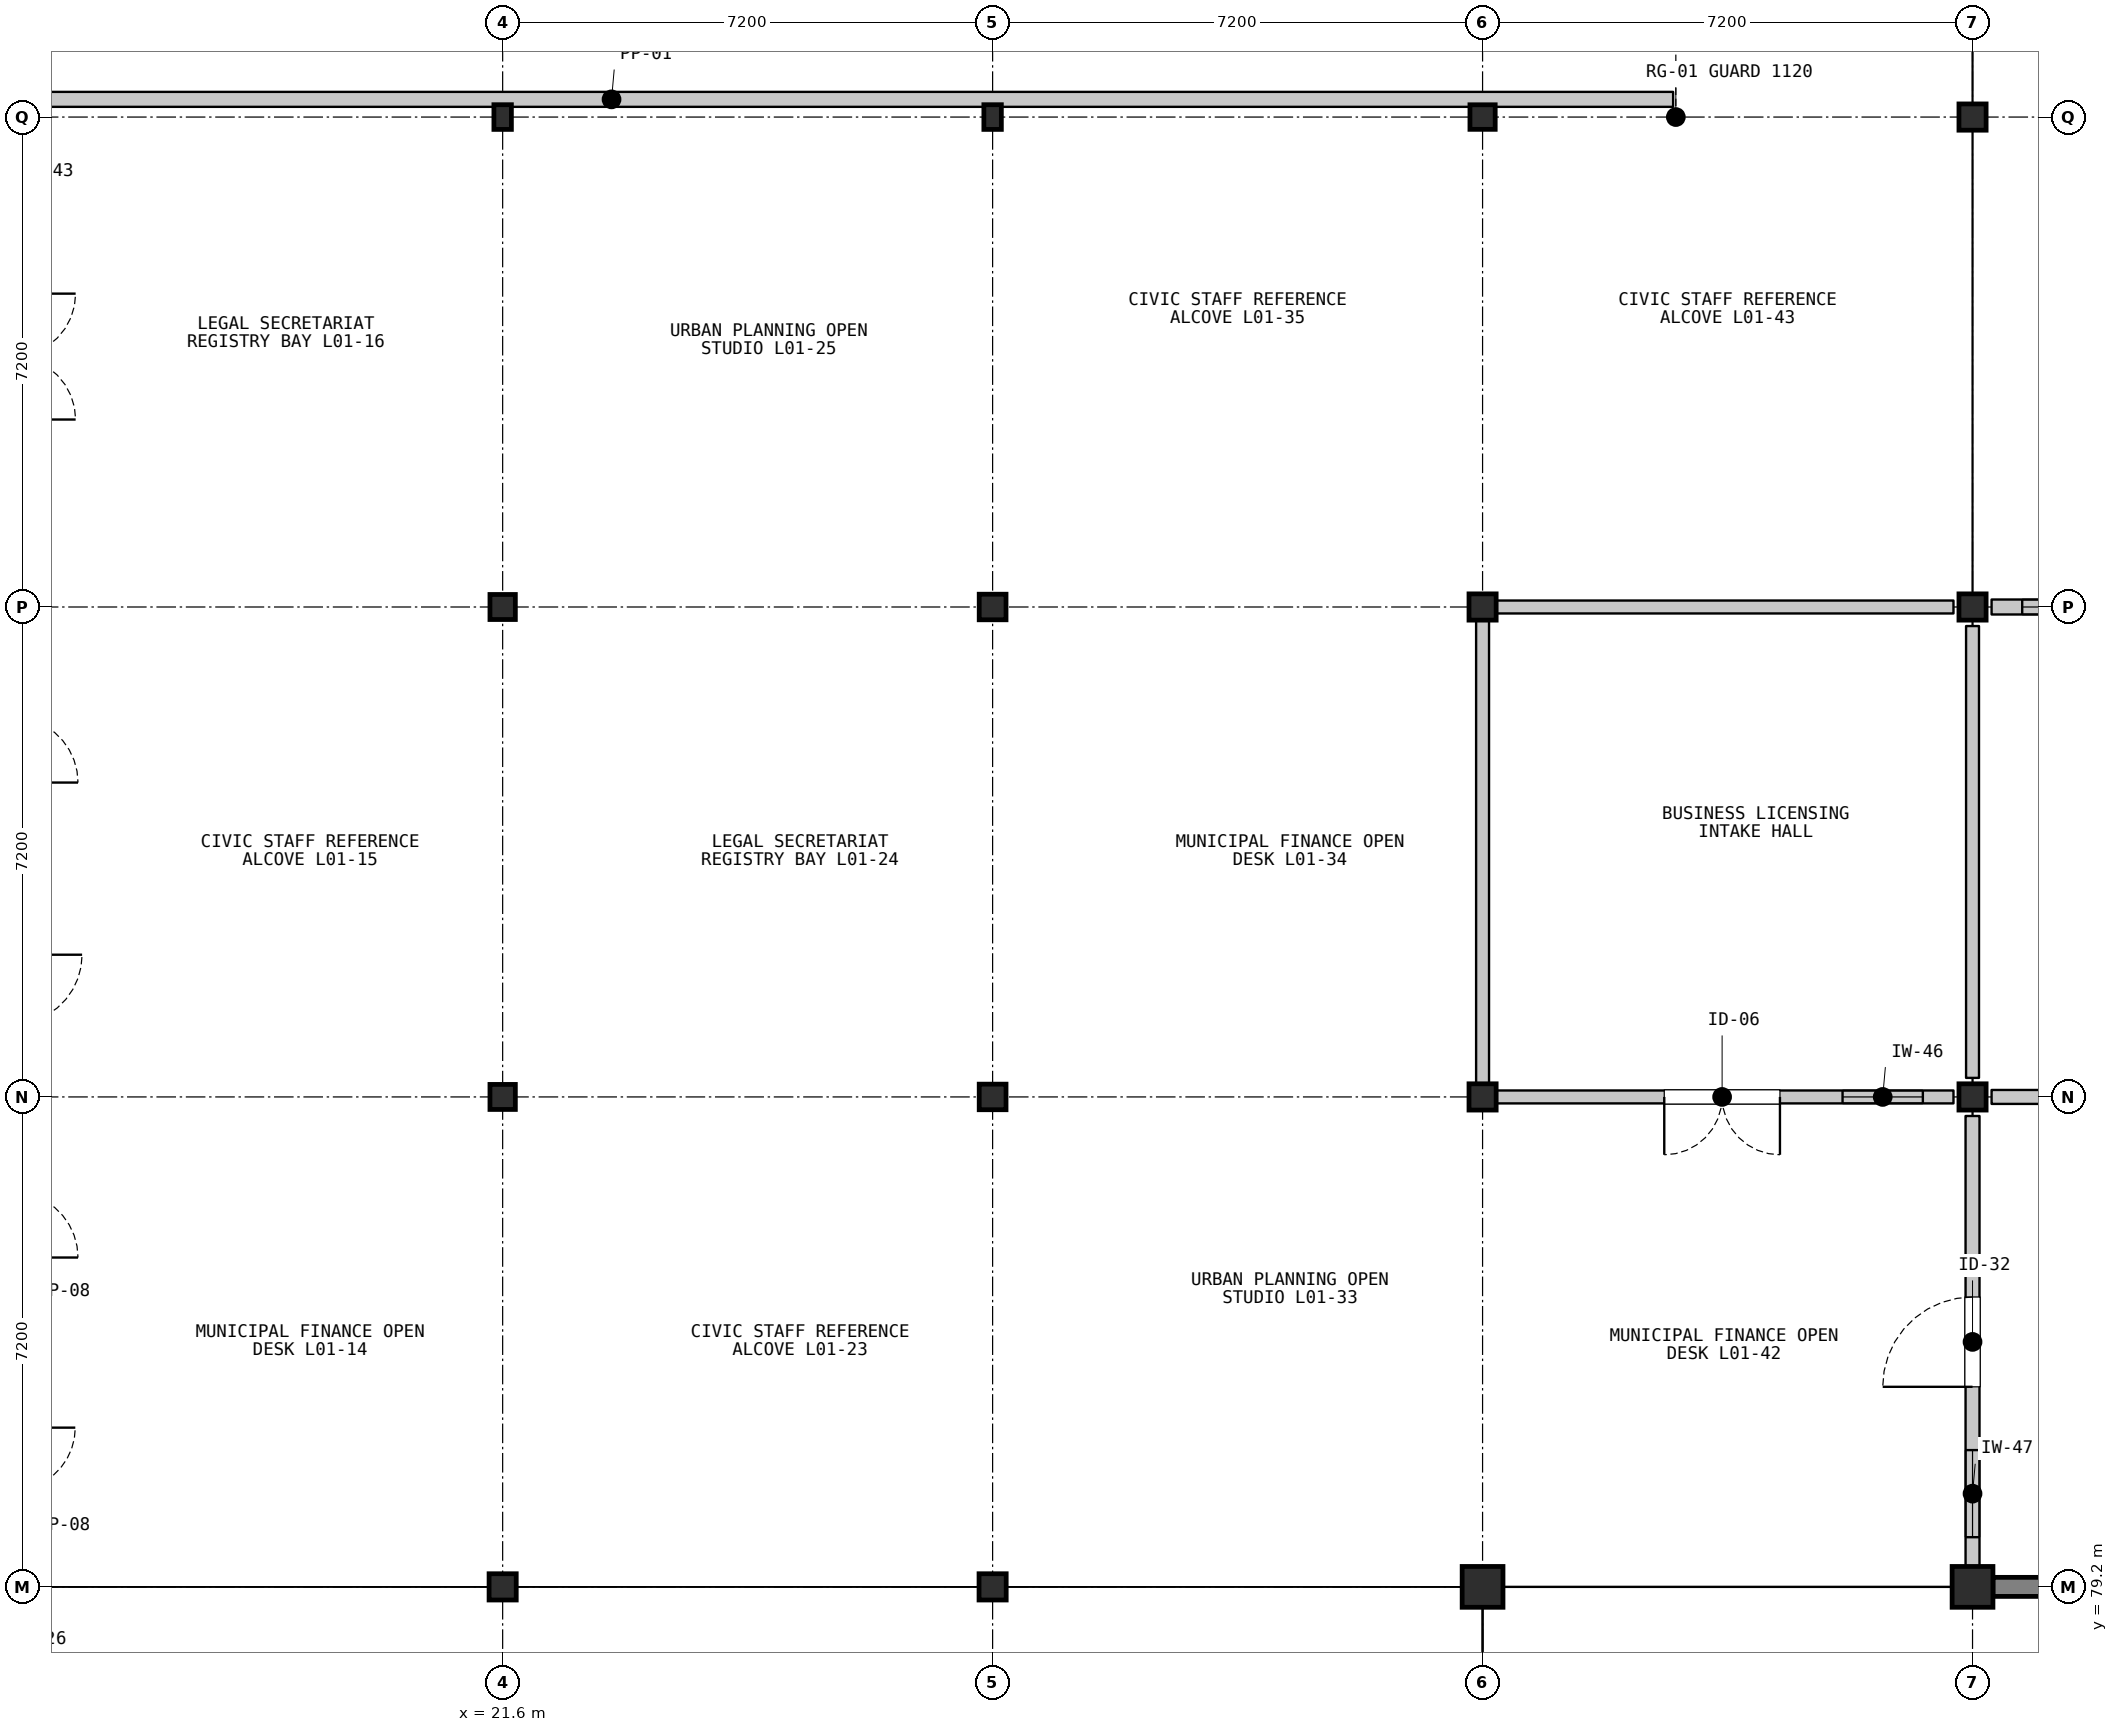
"""IFC4 building model, lengths in metres.
Left out: names, types, materials, properties, quantities, classifications, styles, units other than length and angle.
Written with IfcOpenShell. Run it as: python <this file> out.ifc"""

import sys

from ifc_helpers import new_model, si_unit, direction, frame, frame_2d, origin, origin_2d, place, context, subcontext, project, spatial, rectangle, i_section, extrude, element, fill, save


model = new_model("IFC4")
c1 = context("Model", 3, precision=1e-05, world=origin(), true_north=direction((0.0, 1.0)))
c2 = subcontext(c1, "Body", "Model", "MODEL_VIEW")
j1 = project(units=[si_unit("LENGTHUNIT", "METRE"), si_unit("PLANEANGLEUNIT", "RADIAN")], contexts=[c1])
p1 = place(None, origin())
s1 = spatial("IfcSite", under=j1, at=p1, CompositionType="ELEMENT")
p2 = place(p1, origin())
s2 = spatial("IfcBuilding", under=s1, at=p2, CompositionType="ELEMENT")
p3 = place(p2, origin())
s3 = spatial("IfcBuildingStorey", under=s2, at=p3, CompositionType="ELEMENT", Elevation=0.0)
p4 = place(p3, frame((21.6, 79.2, 0.0), z_axis=(0.0, 0.0, 1.0), x_axis=(1.0, 0.0, 0.0)))
e1 = element("IfcColumn", 1, at=p4, inside=s3, PredefinedType="COLUMN", context=c2, shape_type="SweptSolid", body=[
    extrude(i_section(OverallWidth=0.399, OverallDepth=0.386, WebThickness=0.021, FlangeThickness=0.033, FilletRadius=0.015, at=origin_2d()), origin(), (0.0, 0.0, 1.0), 5.4),
])
for number, where, z_axis, x_axis in (
    (2, (21.6, 86.4, 0.0), (0.0, 0.0, 1.0), (1.0, 0.0, 0.0)),
    (3, (21.6, 93.6, 0.0), (0.0, 0.0, 1.0), (1.0, 0.0, 0.0)),
):
    element("IfcColumn", number, at=place(p3, frame(where, z_axis=z_axis, x_axis=x_axis)), inside=s3, PredefinedType="COLUMN", context=c2, shape_type="SweptSolid", body=[
        extrude(i_section(OverallWidth=0.373, OverallDepth=0.368, WebThickness=0.015, FlangeThickness=0.024, FilletRadius=0.015, at=origin_2d()), origin(), (0.0, 0.0, 1.0), 5.4),
    ])
p5 = place(p3, frame((21.6, 100.8, 0.0), z_axis=(0.0, 0.0, 1.0), x_axis=(1.0, 0.0, 0.0)))
e4 = element("IfcColumn", 4, at=p5, inside=s3, PredefinedType="COLUMN", context=c2, shape_type="SweptSolid", body=[
    extrude(i_section(OverallWidth=0.257, OverallDepth=0.363, WebThickness=0.013, FlangeThickness=0.022, FilletRadius=0.015, at=origin_2d()), origin(), (0.0, 0.0, 1.0), 5.4),
])
p6 = place(p3, frame((28.8, 79.2, 0.0), z_axis=(0.0, 0.0, 1.0), x_axis=(1.0, 0.0, 0.0)))
e5 = element("IfcColumn", 5, at=p6, inside=s3, PredefinedType="COLUMN", context=c2, shape_type="SweptSolid", body=[
    extrude(i_section(OverallWidth=0.399, OverallDepth=0.386, WebThickness=0.021, FlangeThickness=0.033, FilletRadius=0.015, at=origin_2d()), origin(), (0.0, 0.0, 1.0), 5.4),
])
for number, where, z_axis, x_axis in (
    (6, (28.8, 86.4, 0.0), (0.0, 0.0, 1.0), (1.0, 0.0, 0.0)),
    (7, (28.8, 93.6, 0.0), (0.0, 0.0, 1.0), (1.0, 0.0, 0.0)),
):
    element("IfcColumn", number, at=place(p3, frame(where, z_axis=z_axis, x_axis=x_axis)), inside=s3, PredefinedType="COLUMN", context=c2, shape_type="SweptSolid", body=[
        extrude(i_section(OverallWidth=0.394, OverallDepth=0.376, WebThickness=0.017, FlangeThickness=0.028, FilletRadius=0.015, at=origin_2d()), origin(), (0.0, 0.0, 1.0), 5.4),
    ])
p7 = place(p3, frame((28.8, 100.8, 0.0), z_axis=(0.0, 0.0, 1.0), x_axis=(1.0, 0.0, 0.0)))
e8 = element("IfcColumn", 8, at=p7, inside=s3, PredefinedType="COLUMN", context=c2, shape_type="SweptSolid", body=[
    extrude(i_section(OverallWidth=0.257, OverallDepth=0.363, WebThickness=0.013, FlangeThickness=0.022, FilletRadius=0.015, at=origin_2d()), origin(), (0.0, 0.0, 1.0), 5.4),
])
p8 = place(p3, frame((36.0, 79.2, 0.0), z_axis=(0.0, 0.0, 1.0), x_axis=(1.0, 0.0, 0.0)))
e9 = element("IfcColumn", 9, at=p8, inside=s3, PredefinedType="COLUMN", context=c2, shape_type="SweptSolid", body=[
    extrude(rectangle(XDim=0.6, YDim=0.6, at=origin_2d()), origin(), (0.0, 0.0, 1.0), 5.4),
])
for number, where, z_axis, x_axis in (
    (10, (36.0, 86.4, 0.0), (0.0, 0.0, 1.0), (1.0, 0.0, 0.0)),
    (11, (36.0, 93.6, 0.0), (0.0, 0.0, 1.0), (1.0, 0.0, 0.0)),
):
    element("IfcColumn", number, at=place(p3, frame(where, z_axis=z_axis, x_axis=x_axis)), inside=s3, PredefinedType="COLUMN", context=c2, shape_type="SweptSolid", body=[
        extrude(i_section(OverallWidth=0.399, OverallDepth=0.386, WebThickness=0.021, FlangeThickness=0.033, FilletRadius=0.015, at=origin_2d()), origin(), (0.0, 0.0, 1.0), 5.4),
    ])
p9 = place(p3, frame((36.0, 100.8, 0.0), z_axis=(0.0, 0.0, 1.0), x_axis=(1.0, 0.0, 0.0)))
e12 = element("IfcColumn", 12, at=p9, inside=s3, PredefinedType="COLUMN", context=c2, shape_type="SweptSolid", body=[
    extrude(i_section(OverallWidth=0.371, OverallDepth=0.361, WebThickness=0.012, FlangeThickness=0.02, FilletRadius=0.015, at=origin_2d()), origin(), (0.0, 0.0, 1.0), 5.4),
])
p10 = place(p3, frame((43.2, 79.2, 0.0), z_axis=(0.0, 0.0, 1.0), x_axis=(1.0, 0.0, 0.0)))
e13 = element("IfcColumn", 13, at=p10, inside=s3, PredefinedType="COLUMN", context=c2, shape_type="SweptSolid", body=[
    extrude(rectangle(XDim=0.6, YDim=0.6, at=origin_2d()), origin(), (0.0, 0.0, 1.0), 5.4),
])
for number, where, z_axis, x_axis in (
    (14, (43.2, 86.4, 0.0), (0.0, 0.0, 1.0), (1.0, 0.0, 0.0)),
    (15, (43.2, 93.6, 0.0), (0.0, 0.0, 1.0), (1.0, 0.0, 0.0)),
    (16, (43.2, 100.8, 0.0), (0.0, 0.0, 1.0), (1.0, 0.0, 0.0)),
):
    element("IfcColumn", number, at=place(p3, frame(where, z_axis=z_axis, x_axis=x_axis)), inside=s3, PredefinedType="COLUMN", context=c2, shape_type="SweptSolid", body=[
        extrude(i_section(OverallWidth=0.399, OverallDepth=0.386, WebThickness=0.021, FlangeThickness=0.033, FilletRadius=0.015, at=origin_2d()), origin(), (0.0, 0.0, 1.0), 5.4),
    ])
p11 = place(p3, frame((50.025, 79.2, 0.0), z_axis=(0.0, 0.0, 1.0), x_axis=(-1.0, 0.0, 0.0)))
e17 = element("IfcWall", 17, at=p11, inside=s3, PredefinedType="SOLIDWALL", context=c2, shape_type="SweptSolid", body=[
    extrude(rectangle(XDim=6.525, YDim=0.28, at=frame_2d((3.262, 0.0))), origin(), (0.0, 0.0, 1.0), 4.598),
])
p12 = place(p11, frame((0.966, 0.0, 0.95)))
e18 = element("IfcOpeningElement", 18, at=p12, cuts=e17, PredefinedType="OPENING", context=c2, shape_type="SweptSolid", body=[
    extrude(rectangle(XDim=1.2, YDim=1.7, at=frame_2d((0.6, 0.85))), frame((0.0, 0.15, 0.0), z_axis=(0.0, -1.0, 0.0), x_axis=(1.0, 0.0, 0.0)), (0.0, 0.0, 1.0), 0.3),
])
p13 = place(p11, frame((4.359, 0.0, 0.95)))
e19 = element("IfcOpeningElement", 19, at=p13, cuts=e17, PredefinedType="OPENING", context=c2, shape_type="SweptSolid", body=[
    extrude(rectangle(XDim=1.2, YDim=1.7, at=frame_2d((0.6, 0.85))), frame((0.0, 0.15, 0.0), z_axis=(0.0, -1.0, 0.0), x_axis=(1.0, 0.0, 0.0)), (0.0, 0.0, 1.0), 0.3),
])
p14 = place(p3, frame((7.6, 101.06, 0.0), z_axis=(0.0, 0.0, 1.0), x_axis=(1.0, 0.0, 0.0)))
e20 = element("IfcWall", 20, at=p14, inside=s3, PredefinedType="PARAPET", context=c2, shape_type="SweptSolid", body=[
    extrude(rectangle(XDim=31.2, YDim=0.22, at=frame_2d((15.6, 0.0))), origin(), (0.0, 0.0, 1.0), 1.15),
])
p15 = place(p3, frame((42.92, 86.4, 0.0), z_axis=(0.0, 0.0, 1.0), x_axis=(-1.0, 0.0, 0.0)))
e21 = element("IfcWall", 21, at=p15, inside=s3, PredefinedType="PARTITIONING", context=c2, shape_type="SweptSolid", body=[
    extrude(rectangle(XDim=6.8, YDim=0.19, at=frame_2d((3.4, 0.0))), origin(), (0.0, 0.0, 1.0), 4.588),
])
p16 = place(p15, frame((2.55, 0.0, 0.0)))
e22 = element("IfcOpeningElement", 22, at=p16, cuts=e21, PredefinedType="OPENING", context=c2, shape_type="SweptSolid", body=[
    extrude(rectangle(XDim=1.7, YDim=2.35, at=frame_2d((0.85, 1.175))), frame((0.0, 0.105, 0.0), z_axis=(0.0, -1.0, 0.0), x_axis=(1.0, 0.0, 0.0)), (0.0, 0.0, 1.0), 0.21),
])
p17 = place(p15, frame((0.45, 0.0, 1.05)))
e23 = element("IfcOpeningElement", 23, at=p17, cuts=e21, PredefinedType="OPENING", context=c2, shape_type="SweptSolid", body=[
    extrude(rectangle(XDim=1.18, YDim=1.44, at=frame_2d((0.59, 0.72))), frame((0.0, 0.105, 0.0), z_axis=(0.0, -1.0, 0.0), x_axis=(1.0, 0.0, 0.0)), (0.0, 0.0, 1.0), 0.21),
])
p18 = place(p3, frame((36.12, 93.6, 0.0), z_axis=(0.0, 0.0, 1.0), x_axis=(1.0, 0.0, 0.0)))
e24 = element("IfcWall", 24, at=p18, inside=s3, PredefinedType="PARTITIONING", context=c2, shape_type="SweptSolid", body=[
    extrude(rectangle(XDim=6.8, YDim=0.19, at=frame_2d((3.4, 0.0))), origin(), (0.0, 0.0, 1.0), 4.588),
])
p19 = place(p3, frame((36.0, 86.52, 0.0), z_axis=(0.0, 0.0, 1.0), x_axis=(0.0, 1.0, 0.0)))
e25 = element("IfcWall", 25, at=p19, inside=s3, PredefinedType="PARTITIONING", context=c2, shape_type="SweptSolid", body=[
    extrude(rectangle(XDim=6.96, YDim=0.19, at=frame_2d((3.48, 0.0))), origin(), (0.0, 0.0, 1.0), 4.588),
])
p20 = place(p3, frame((43.2, 93.32, 0.0), z_axis=(0.0, 0.0, 1.0), x_axis=(0.0, -1.0, 0.0)))
e26 = element("IfcWall", 26, at=p20, inside=s3, PredefinedType="PARTITIONING", context=c2, shape_type="SweptSolid", body=[
    extrude(rectangle(XDim=6.64, YDim=0.19, at=frame_2d((3.32, 0.0))), origin(), (0.0, 0.0, 1.0), 4.657),
])
p21 = place(p3, frame((43.2, 79.48, 0.0), z_axis=(0.0, 0.0, 1.0), x_axis=(0.0, 1.0, 0.0)))
e27 = element("IfcWall", 27, at=p21, inside=s3, PredefinedType="PARTITIONING", context=c2, shape_type="SweptSolid", body=[
    extrude(rectangle(XDim=6.64, YDim=0.205, at=frame_2d((3.32, 0.0))), origin(), (0.0, 0.0, 1.0), 4.657),
])
p22 = place(p21, frame((2.66, 0.0, 0.0)))
e28 = element("IfcOpeningElement", 28, at=p22, cuts=e27, PredefinedType="OPENING", context=c2, shape_type="SweptSolid", body=[
    extrude(rectangle(XDim=1.32, YDim=2.24, at=frame_2d((0.66, 1.12))), frame((0.0, 0.113, 0.0), z_axis=(0.0, -1.0, 0.0), x_axis=(1.0, 0.0, 0.0)), (0.0, 0.0, 1.0), 0.225),
])
p23 = place(p21, frame((0.45, 0.0, 1.05)))
e29 = element("IfcOpeningElement", 29, at=p23, cuts=e27, PredefinedType="OPENING", context=c2, shape_type="SweptSolid", body=[
    extrude(rectangle(XDim=1.28, YDim=1.44, at=frame_2d((0.64, 0.72))), frame((0.0, 0.113, 0.0), z_axis=(0.0, -1.0, 0.0), x_axis=(1.0, 0.0, 0.0)), (0.0, 0.0, 1.0), 0.225),
])
p24 = place(p3, frame((43.48, 86.4, 0.0), z_axis=(0.0, 0.0, 1.0), x_axis=(1.0, 0.0, 0.0)))
e30 = element("IfcWall", 30, at=p24, inside=s3, PredefinedType="PARTITIONING", context=c2, shape_type="SweptSolid", body=[
    extrude(rectangle(XDim=6.8, YDim=0.205, at=frame_2d((3.4, 0.0))), origin(), (0.0, 0.0, 1.0), 4.588),
])
p25 = place(p3, frame((43.48, 93.6, 0.0), z_axis=(0.0, 0.0, 1.0), x_axis=(1.0, 0.0, 0.0)))
e31 = element("IfcWall", 31, at=p25, inside=s3, PredefinedType="PARTITIONING", context=c2, shape_type="SweptSolid", body=[
    extrude(rectangle(XDim=6.8, YDim=0.22, at=frame_2d((3.4, 0.0))), origin(), (0.0, 0.0, 1.0), 4.588),
])
p26 = place(p25, frame((2.72, 0.0, 0.0)))
e32 = element("IfcOpeningElement", 32, at=p26, cuts=e31, PredefinedType="OPENING", context=c2, shape_type="SweptSolid", body=[
    extrude(rectangle(XDim=1.36, YDim=2.24, at=frame_2d((0.68, 1.12))), frame((0.0, 0.12, 0.0), z_axis=(0.0, -1.0, 0.0), x_axis=(1.0, 0.0, 0.0)), (0.0, 0.0, 1.0), 0.24),
])
p27 = place(p25, frame((0.45, 0.0, 1.05)))
e33 = element("IfcOpeningElement", 33, at=p27, cuts=e31, PredefinedType="OPENING", context=c2, shape_type="SweptSolid", body=[
    extrude(rectangle(XDim=1.38, YDim=1.44, at=frame_2d((0.69, 0.72))), frame((0.0, 0.12, 0.0), z_axis=(0.0, -1.0, 0.0), x_axis=(1.0, 0.0, 0.0)), (0.0, 0.0, 1.0), 0.24),
])
p28 = place(p16, origin())
e34 = element("IfcDoor", 34, at=p28, inside=s3, OperationType="DOUBLE_DOOR_SINGLE_SWING", PredefinedType="DOOR", context=c2, shape_type="SweptSolid", body=[
    extrude(rectangle(XDim=1.7, YDim=2.35, at=frame_2d((0.85, 1.175))), frame((0.0, 0.025, 0.0), z_axis=(0.0, -1.0, 0.0), x_axis=(1.0, 0.0, 0.0)), (0.0, 0.0, 1.0), 0.05),
])
fill(e22, e34)
p29 = place(p17, origin())
e35 = element("IfcWindow", 35, at=p29, inside=s3, PartitioningType="SINGLE_PANEL", PredefinedType="WINDOW", context=c2, shape_type="SweptSolid", body=[
    extrude(rectangle(XDim=1.18, YDim=1.44, at=frame_2d((0.59, 0.72))), frame((0.0, 0.03, 0.0), z_axis=(0.0, -1.0, 0.0), x_axis=(1.0, 0.0, 0.0)), (0.0, 0.0, 1.0), 0.06),
])
fill(e23, e35)
p30 = place(p22, origin())
e36 = element("IfcDoor", 36, at=p30, inside=s3, OperationType="SINGLE_SWING_LEFT", PredefinedType="DOOR", context=c2, shape_type="SweptSolid", body=[
    extrude(rectangle(XDim=1.32, YDim=2.24, at=frame_2d((0.66, 1.12))), frame((0.0, 0.025, 0.0), z_axis=(0.0, -1.0, 0.0), x_axis=(1.0, 0.0, 0.0)), (0.0, 0.0, 1.0), 0.05),
])
fill(e28, e36)
p31 = place(p23, origin())
e37 = element("IfcWindow", 37, at=p31, inside=s3, PartitioningType="SINGLE_PANEL", PredefinedType="WINDOW", context=c2, shape_type="SweptSolid", body=[
    extrude(rectangle(XDim=1.28, YDim=1.44, at=frame_2d((0.64, 0.72))), frame((0.0, 0.03, 0.0), z_axis=(0.0, -1.0, 0.0), x_axis=(1.0, 0.0, 0.0)), (0.0, 0.0, 1.0), 0.06),
])
fill(e29, e37)
p32 = place(p27, origin())
e38 = element("IfcWindow", 38, at=p32, inside=s3, PartitioningType="SINGLE_PANEL", PredefinedType="WINDOW", context=c2, shape_type="SweptSolid", body=[
    extrude(rectangle(XDim=1.38, YDim=1.44, at=frame_2d((0.69, 0.72))), frame((0.0, 0.03, 0.0), z_axis=(0.0, -1.0, 0.0), x_axis=(1.0, 0.0, 0.0)), (0.0, 0.0, 1.0), 0.06),
])
fill(e33, e38)
save(model, sys.argv[1])
